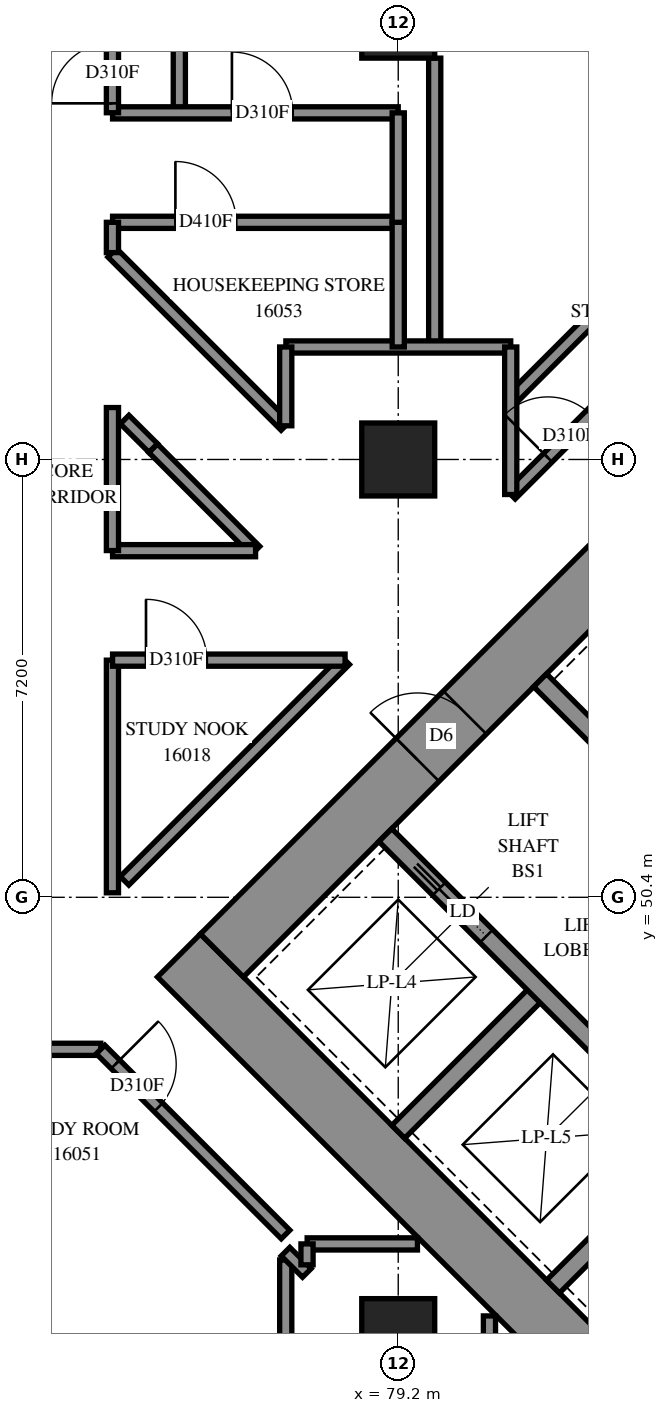
"""IFC4 building model, lengths in metres.
Left out: names, types, materials, properties, quantities, classifications, styles, units other than length and angle.
Written with IfcOpenShell. Run it as: python <this file> out.ifc"""

import sys

from ifc_helpers import new_model, si_unit, direction, frame, frame_2d, origin, origin_2d, place, context, subcontext, project, spatial, rectangle, extrude, element, fill, save


model = new_model("IFC4")
c1 = context("Model", 3, precision=1e-05, world=origin(), true_north=direction((0.0, 1.0)))
c2 = subcontext(c1, "Body", "Model", "MODEL_VIEW")
j1 = project(units=[si_unit("LENGTHUNIT", "METRE"), si_unit("PLANEANGLEUNIT", "RADIAN")], contexts=[c1])
p1 = place(None, origin())
s1 = spatial("IfcSite", under=j1, at=p1, CompositionType="ELEMENT")
p2 = place(p1, origin())
s2 = spatial("IfcBuilding", under=s1, at=p2, CompositionType="ELEMENT")
p3 = place(p2, frame((0.0, 0.0, 61.0)))
s3 = spatial("IfcBuildingStorey", under=s2, at=p3, CompositionType="ELEMENT", Elevation=61.0)
for number, where, z_axis, x_axis in (
    (1, (79.2, 43.2, 0.0), (0.0, 0.0, 1.0), (1.0, 0.0, 0.0)),
    (2, (79.2, 57.6, 0.0), (0.0, 0.0, 1.0), (1.0, 0.0, 0.0)),
    (3, (79.2, 64.8, 0.0), (0.0, 0.0, 1.0), (1.0, 0.0, 0.0)),
):
    element("IfcColumn", number, at=place(p3, frame(where, z_axis=z_axis, x_axis=x_axis)), inside=s3, PredefinedType="COLUMN", context=c2, shape_type="SweptSolid", body=[
        extrude(rectangle(XDim=1.2, YDim=1.2, at=origin_2d()), origin(), (0.0, 0.0, 1.0), 3.1),
    ])
p4 = place(p3, frame((75.594, 49.443, -0.3), z_axis=(0.0, 0.0, 1.0), x_axis=(0.7071037324, -0.70710983, 0.0)))
e4 = element("IfcWall", 4, at=p4, inside=s3, PredefinedType="SHEAR", context=c2, shape_type="SweptSolid", body=[
    extrude(rectangle(XDim=16.4, YDim=1.0, at=frame_2d((8.2, 0.0))), origin(), (0.0, 0.0, 1.0), 2.7),
])
p5 = place(p3, frame((76.301, 49.443, -0.3), z_axis=(0.0, 0.0, 1.0), x_axis=(0.7071067812, 0.7071067812, 0.0)))
e5 = element("IfcWall", 5, at=p5, inside=s3, PredefinedType="SHEAR", context=c2, shape_type="SweptSolid", body=[
    extrude(rectangle(XDim=14.4, YDim=1.0, at=frame_2d((7.2, 0.0))), origin(), (0.0, 0.0, 1.0), 2.7),
])
p6 = place(p5, frame((4.55, 0.0, 0.3)))
e6 = element("IfcOpeningElement", 6, at=p6, cuts=e5, PredefinedType="OPENING", context=c2, shape_type="SweptSolid", body=[
    extrude(rectangle(XDim=1.1, YDim=2.1, at=frame_2d((0.55, 1.05))), frame((0.0, 0.51, 0.0), z_axis=(0.0, -1.0, 0.0), x_axis=(1.0, 0.0, 0.0)), (0.0, 0.0, 1.0), 1.02),
])
p7 = place(p5, frame((11.35, 0.0, 0.3)))
e7 = element("IfcOpeningElement", 7, at=p7, cuts=e5, PredefinedType="OPENING", context=c2, shape_type="SweptSolid", body=[
    extrude(rectangle(XDim=1.1, YDim=2.1, at=frame_2d((0.55, 1.05))), frame((0.0, 0.51, 0.0), z_axis=(0.0, -1.0, 0.0), x_axis=(1.0, 0.0, 0.0)), (0.0, 0.0, 1.0), 1.02),
])
p8 = place(p3, frame((79.2, 46.544, 0.0), z_axis=(0.0, 0.0, 1.0), x_axis=(0.7071219326, 0.7070916295, 0.0)))
e8 = element("IfcWall", 8, at=p8, inside=s3, PredefinedType="SOLIDWALL", context=c2, shape_type="SweptSolid", body=[
    extrude(rectangle(XDim=3.3, YDim=0.3, at=frame_2d((1.65, 0.0))), origin(), (0.0, 0.0, 1.0), 3.1),
])
p9 = place(p3, frame((81.746, 43.999, 0.0), z_axis=(0.0, 0.0, 1.0), x_axis=(0.7071067812, 0.7071067812, 0.0)))
e9 = element("IfcWall", 9, at=p9, inside=s3, PredefinedType="SOLIDWALL", context=c2, shape_type="SweptSolid", body=[
    extrude(rectangle(XDim=3.3, YDim=0.3, at=frame_2d((1.65, 0.0))), origin(), (0.0, 0.0, 1.0), 3.1),
])
p10 = place(p3, frame((78.988, 51.423, 0.0), z_axis=(0.0, 0.0, 1.0), x_axis=(0.7071067812, -0.7071067812, 0.0)))
e10 = element("IfcWall", 10, at=p10, inside=s3, PredefinedType="SOLIDWALL", context=c2, shape_type="SweptSolid", body=[
    extrude(rectangle(XDim=14.4, YDim=0.3, at=frame_2d((7.2, 0.0))), origin(), (0.0, 0.0, 1.0), 3.1),
])
p11 = place(p10, frame((1.25, 0.0, 0.0)))
e11 = element("IfcOpeningElement", 11, at=p11, cuts=e10, PredefinedType="OPENING", context=c2, shape_type="SweptSolid", body=[
    extrude(rectangle(XDim=1.1, YDim=2.1, at=frame_2d((0.55, 1.05))), frame((0.0, 0.16, 0.0), z_axis=(0.0, -1.0, 0.0), x_axis=(1.0, 0.0, 0.0)), (0.0, 0.0, 1.0), 0.32),
])
p12 = place(p10, frame((4.85, 0.0, 0.0)))
e12 = element("IfcOpeningElement", 12, at=p12, cuts=e10, PredefinedType="OPENING", context=c2, shape_type="SweptSolid", body=[
    extrude(rectangle(XDim=1.1, YDim=2.1, at=frame_2d((0.55, 1.05))), frame((0.0, 0.16, 0.0), z_axis=(0.0, -1.0, 0.0), x_axis=(1.0, 0.0, 0.0)), (0.0, 0.0, 1.0), 0.32),
])
p13 = place(p10, frame((8.45, 0.0, 0.0)))
e13 = element("IfcOpeningElement", 13, at=p13, cuts=e10, PredefinedType="OPENING", context=c2, shape_type="SweptSolid", body=[
    extrude(rectangle(XDim=1.1, YDim=2.1, at=frame_2d((0.55, 1.05))), frame((0.0, 0.16, 0.0), z_axis=(0.0, -1.0, 0.0), x_axis=(1.0, 0.0, 0.0)), (0.0, 0.0, 1.0), 0.32),
])
p14 = place(p10, frame((12.05, 0.0, 0.0)))
e14 = element("IfcOpeningElement", 14, at=p14, cuts=e10, PredefinedType="OPENING", context=c2, shape_type="SweptSolid", body=[
    extrude(rectangle(XDim=1.1, YDim=2.1, at=frame_2d((0.55, 1.05))), frame((0.0, 0.16, 0.0), z_axis=(0.0, -1.0, 0.0), x_axis=(1.0, 0.0, 0.0)), (0.0, 0.0, 1.0), 0.32),
])
p15 = place(p3, frame((81.534, 53.969, 0.0), z_axis=(0.0, 0.0, 1.0), x_axis=(0.707103309, -0.7071102534, 0.0)))
e15 = element("IfcWall", 15, at=p15, inside=s3, PredefinedType="SOLIDWALL", context=c2, shape_type="SweptSolid", body=[
    extrude(rectangle(XDim=14.4, YDim=0.3, at=frame_2d((7.2, 0.0))), origin(), (0.0, 0.0, 1.0), 3.1),
])
p16 = place(p15, frame((12.05, 0.0, 0.0)))
e16 = element("IfcOpeningElement", 16, at=p16, cuts=e15, PredefinedType="OPENING", context=c2, shape_type="SweptSolid", body=[
    extrude(rectangle(XDim=1.1, YDim=2.1, at=frame_2d((0.55, 1.05))), frame((0.0, 0.16, 0.0), z_axis=(0.0, -1.0, 0.0), x_axis=(1.0, 0.0, 0.0)), (0.0, 0.0, 1.0), 0.32),
])
p17 = place(p3, frame((55.1, 47.9, 0.0), z_axis=(0.0, 0.0, 1.0), x_axis=(1.0, 0.0, 0.0)))
e17 = element("IfcWall", 17, at=p17, inside=s3, PredefinedType="PARTITIONING", context=c2, shape_type="SweptSolid", body=[
    extrude(rectangle(XDim=19.208, YDim=0.2, at=frame_2d((9.604, 0.0))), origin(), (0.0, 0.0, 1.0), 3.1),
])
p18 = place(p17, frame((6.399, 0.0, 0.0)))
e18 = element("IfcOpeningElement", 18, at=p18, cuts=e17, PredefinedType="OPENING", context=c2, shape_type="SweptSolid", body=[
    extrude(rectangle(XDim=0.9, YDim=2.1, at=frame_2d((0.45, 1.05))), frame((0.0, 0.11, 0.0), z_axis=(0.0, -1.0, 0.0), x_axis=(1.0, 0.0, 0.0)), (0.0, 0.0, 1.0), 0.22),
])
p19 = place(p17, frame((13.561, 0.0, 0.0)))
e19 = element("IfcOpeningElement", 19, at=p19, cuts=e17, PredefinedType="OPENING", context=c2, shape_type="SweptSolid", body=[
    extrude(rectangle(XDim=0.9, YDim=2.1, at=frame_2d((0.45, 1.05))), frame((0.0, 0.11, 0.0), z_axis=(0.0, -1.0, 0.0), x_axis=(1.0, 0.0, 0.0)), (0.0, 0.0, 1.0), 0.22),
])
p20 = place(p3, frame((75.6, 63.3, 0.0), z_axis=(0.0, 0.0, 1.0), x_axis=(0.0, 1.0, 0.0)))
e20 = element("IfcWall", 20, at=p20, inside=s3, PredefinedType="PARTITIONING", context=c2, shape_type="SweptSolid", body=[
    extrude(rectangle(XDim=9.467, YDim=0.2, at=frame_2d((4.734, 0.0))), origin(), (0.0, 0.0, 1.0), 3.1),
])
p21 = place(p3, frame((81.049, 58.577, 0.0), z_axis=(0.0, 0.0, 1.0), x_axis=(0.7071067812, 0.7071067812, 0.0)))
e21 = element("IfcWall", 21, at=p21, inside=s3, PredefinedType="PARTITIONING", context=c2, shape_type="SweptSolid", body=[
    extrude(rectangle(XDim=9.086, YDim=0.2, at=frame_2d((4.543, 0.0))), origin(), (0.0, 0.0, 1.0), 3.1),
])
p22 = place(p3, frame((81.053, 57.021, 0.0), z_axis=(0.0, 0.0, 1.0), x_axis=(0.7069845395, 0.7072290017, 0.0)))
e22 = element("IfcWall", 22, at=p22, inside=s3, PredefinedType="PARTITIONING", context=c2, shape_type="SweptSolid", body=[
    extrude(rectangle(XDim=8.181, YDim=0.2, at=frame_2d((4.091, 0.0))), origin(), (0.0, 0.0, 1.0), 3.1),
])
p23 = place(p22, frame((0.86, 0.0, 0.0)))
e23 = element("IfcOpeningElement", 23, at=p23, cuts=e22, PredefinedType="OPENING", context=c2, shape_type="SweptSolid", body=[
    extrude(rectangle(XDim=1.0, YDim=2.1, at=frame_2d((0.5, 1.05))), frame((0.0, 0.11, 0.0), z_axis=(0.0, -1.0, 0.0), x_axis=(1.0, 0.0, 0.0)), (0.0, 0.0, 1.0), 0.22),
])
p24 = place(p3, frame((74.699, 50.671, 0.0), z_axis=(0.0, 0.0, 1.0), x_axis=(0.7071067812, 0.7071067812, 0.0)))
e24 = element("IfcWall", 24, at=p24, inside=s3, PredefinedType="PARTITIONING", context=c2, shape_type="SweptSolid", body=[
    extrude(rectangle(XDim=5.131, YDim=0.2, at=frame_2d((2.565, 0.0))), origin(), (0.0, 0.0, 1.0), 3.1),
])
p25 = place(p3, frame((79.8, 59.45, 0.0), z_axis=(0.0, 0.0, 1.0), x_axis=(0.0, 1.0, 0.0)))
e25 = element("IfcWall", 25, at=p25, inside=s3, PredefinedType="PARTITIONING", context=c2, shape_type="SweptSolid", body=[
    extrude(rectangle(XDim=4.75, YDim=0.2, at=frame_2d((2.375, 0.0))), origin(), (0.0, 0.0, 1.0), 3.1),
])
p26 = place(p3, frame((74.502, 63.3, 0.0), z_axis=(0.0, 0.0, 1.0), x_axis=(1.0, 0.0, 0.0)))
e26 = element("IfcWall", 26, at=p26, inside=s3, PredefinedType="PARTITIONING", context=c2, shape_type="SweptSolid", body=[
    extrude(rectangle(XDim=4.698, YDim=0.2, at=frame_2d((2.349, 0.0))), origin(), (0.0, 0.0, 1.0), 3.1),
])
p27 = place(p26, frame((1.963, 0.0, 0.0)))
e27 = element("IfcOpeningElement", 27, at=p27, cuts=e26, PredefinedType="OPENING", context=c2, shape_type="SweptSolid", body=[
    extrude(rectangle(XDim=1.0, YDim=2.1, at=frame_2d((0.5, 1.05))), frame((0.0, 0.11, 0.0), z_axis=(0.0, -1.0, 0.0), x_axis=(1.0, 0.0, 0.0)), (0.0, 0.0, 1.0), 0.22),
])
p28 = place(p3, frame((74.502, 61.5, 0.0), z_axis=(0.0, 0.0, 1.0), x_axis=(1.0, 0.0, 0.0)))
e28 = element("IfcWall", 28, at=p28, inside=s3, PredefinedType="PARTITIONING", context=c2, shape_type="SweptSolid", body=[
    extrude(rectangle(XDim=4.698, YDim=0.2, at=frame_2d((2.349, 0.0))), origin(), (0.0, 0.0, 1.0), 3.1),
])
p29 = place(p28, frame((1.034, 0.0, 0.0)))
e29 = element("IfcOpeningElement", 29, at=p29, cuts=e28, PredefinedType="OPENING", context=c2, shape_type="SweptSolid", body=[
    extrude(rectangle(XDim=1.0, YDim=2.1, at=frame_2d((0.5, 1.05))), frame((0.0, 0.11, 0.0), z_axis=(0.0, -1.0, 0.0), x_axis=(1.0, 0.0, 0.0)), (0.0, 0.0, 1.0), 0.22),
])
p30 = place(p3, frame((74.305, 47.897, 0.0), z_axis=(0.0, 0.0, 1.0), x_axis=(0.7071067812, -0.7071067812, 0.0)))
e30 = element("IfcWall", 30, at=p30, inside=s3, PredefinedType="PARTITIONING", context=c2, shape_type="SweptSolid", body=[
    extrude(rectangle(XDim=4.302, YDim=0.2, at=frame_2d((2.151, 0.0))), origin(), (0.0, 0.0, 1.0), 3.1),
])
p31 = place(p30, frame((0.345, 0.0, 0.0)))
e31 = element("IfcOpeningElement", 31, at=p31, cuts=e30, PredefinedType="OPENING", context=c2, shape_type="SweptSolid", body=[
    extrude(rectangle(XDim=1.0, YDim=2.1, at=frame_2d((0.5, 1.05))), frame((0.0, 0.11, 0.0), z_axis=(0.0, -1.0, 0.0), x_axis=(1.0, 0.0, 0.0)), (0.0, 0.0, 1.0), 0.22),
])
p32 = place(p3, frame((74.497, 60.999, 0.0), z_axis=(0.0, 0.0, 1.0), x_axis=(0.7071067812, -0.7071067812, 0.0)))
e32 = element("IfcWall", 32, at=p32, inside=s3, PredefinedType="PARTITIONING", context=c2, shape_type="SweptSolid", body=[
    extrude(rectangle(XDim=4.028, YDim=0.2, at=frame_2d((2.014, 0.0))), origin(), (0.0, 0.0, 1.0), 3.1),
])
p33 = place(p3, frame((74.5, 63.302, 0.0), z_axis=(0.0, 0.0, 1.0), x_axis=(0.0, 1.0, 0.0)))
e33 = element("IfcWall", 33, at=p33, inside=s3, PredefinedType="PARTITIONING", context=c2, shape_type="SweptSolid", body=[
    extrude(rectangle(XDim=3.998, YDim=0.2, at=frame_2d((1.999, 0.0))), origin(), (0.0, 0.0, 1.0), 3.1),
])
p34 = place(p33, frame((0.154, 0.0, 0.0)))
e34 = element("IfcOpeningElement", 34, at=p34, cuts=e33, PredefinedType="OPENING", context=c2, shape_type="SweptSolid", body=[
    extrude(rectangle(XDim=1.0, YDim=2.1, at=frame_2d((0.5, 1.05))), frame((0.0, 0.11, 0.0), z_axis=(0.0, -1.0, 0.0), x_axis=(1.0, 0.0, 0.0)), (0.0, 0.0, 1.0), 0.22),
])
p35 = place(p3, frame((74.5, 50.474, 0.0), z_axis=(0.0, 0.0, 1.0), x_axis=(0.0, 1.0, 0.0)))
e35 = element("IfcWall", 35, at=p35, inside=s3, PredefinedType="PARTITIONING", context=c2, shape_type="SweptSolid", body=[
    extrude(rectangle(XDim=3.826, YDim=0.2, at=frame_2d((1.913, 0.0))), origin(), (0.0, 0.0, 1.0), 3.1),
])
p36 = place(p3, frame((74.502, 54.3, 0.0), z_axis=(0.0, 0.0, 1.0), x_axis=(1.0, 0.0, 0.0)))
e36 = element("IfcWall", 36, at=p36, inside=s3, PredefinedType="PARTITIONING", context=c2, shape_type="SweptSolid", body=[
    extrude(rectangle(XDim=3.824, YDim=0.2, at=frame_2d((1.912, 0.0))), origin(), (0.0, 0.0, 1.0), 3.1),
])
p37 = place(p36, frame((0.55, 0.0, 0.0)))
e37 = element("IfcOpeningElement", 37, at=p37, cuts=e36, PredefinedType="OPENING", context=c2, shape_type="SweptSolid", body=[
    extrude(rectangle(XDim=1.0, YDim=2.1, at=frame_2d((0.5, 1.05))), frame((0.0, 0.11, 0.0), z_axis=(0.0, -1.0, 0.0), x_axis=(1.0, 0.0, 0.0)), (0.0, 0.0, 1.0), 0.22),
])
p38 = place(p3, frame((77.352, 59.45, 0.0), z_axis=(0.0, 0.0, 1.0), x_axis=(1.0, 0.0, 0.0)))
e38 = element("IfcWall", 38, at=p38, inside=s3, PredefinedType="PARTITIONING", context=c2, shape_type="SweptSolid", body=[
    extrude(rectangle(XDim=3.698, YDim=0.2, at=frame_2d((1.849, 0.0))), origin(), (0.0, 0.0, 1.0), 3.1),
])
p39 = place(p3, frame((77.35, 40.949, 0.0), z_axis=(0.0, 0.0, 1.0), x_axis=(0.0, 1.0, 0.0)))
e39 = element("IfcWall", 39, at=p39, inside=s3, PredefinedType="PARTITIONING", context=c2, shape_type="SweptSolid", body=[
    extrude(rectangle(XDim=3.487, YDim=0.2, at=frame_2d((1.743, 0.0))), origin(), (0.0, 0.0, 1.0), 3.1),
])
p40 = place(p3, frame((81.05, 57.024, 0.0), z_axis=(0.0, 0.0, 1.0), x_axis=(0.0, 1.0, 0.0)))
e40 = element("IfcWall", 40, at=p40, inside=s3, PredefinedType="PARTITIONING", context=c2, shape_type="SweptSolid", body=[
    extrude(rectangle(XDim=2.426, YDim=0.2, at=frame_2d((1.213, 0.0))), origin(), (0.0, 0.0, 1.0), 3.1),
])
p41 = place(p3, frame((75.168, 57.786, 0.0), z_axis=(0.0, 0.0, 1.0), x_axis=(0.7066870088, -0.7075263045, 0.0)))
e41 = element("IfcWall", 41, at=p41, inside=s3, PredefinedType="PARTITIONING", context=c2, shape_type="SweptSolid", body=[
    extrude(rectangle(XDim=2.383, YDim=0.2, at=frame_2d((1.192, 0.0))), origin(), (0.0, 0.0, 1.0), 3.1),
])
for number, where, z_axis, x_axis in (
    (42, (74.502, 56.1, 0.0), (0.0, 0.0, 1.0), (1.0, 0.0, 0.0)),
    (43, (74.5, 56.102, 0.0), (0.0, 0.0, 1.0), (0.0, 1.0, 0.0)),
):
    element("IfcWall", number, at=place(p3, frame(where, z_axis=z_axis, x_axis=x_axis)), inside=s3, PredefinedType="PARTITIONING", context=c2, shape_type="SweptSolid", body=[
        extrude(rectangle(XDim=2.352, YDim=0.2, at=frame_2d((1.176, 0.0))), origin(), (0.0, 0.0, 1.0), 3.1),
    ])
p42 = place(p3, frame((79.2, 59.45, 0.0), z_axis=(0.0, 0.0, 1.0), x_axis=(0.0, 1.0, 0.0)))
e44 = element("IfcWall", 44, at=p42, inside=s3, PredefinedType="PARTITIONING", context=c2, shape_type="SweptSolid", body=[
    extrude(rectangle(XDim=2.05, YDim=0.2, at=frame_2d((1.025, 0.0))), origin(), (0.0, 0.0, 1.0), 3.1),
])
for number, where, z_axis, x_axis in (
    (45, (77.702, 44.7, 0.0), (0.0, 0.0, 1.0), (1.0, 0.0, 0.0)),
    (46, (80.7, 41.702, 0.0), (0.0, 0.0, 1.0), (0.0, 1.0, 0.0)),
):
    element("IfcWall", number, at=place(p3, frame(where, z_axis=z_axis, x_axis=x_axis)), inside=s3, PredefinedType="PARTITIONING", context=c2, shape_type="SweptSolid", body=[
        extrude(rectangle(XDim=1.814, YDim=0.2, at=frame_2d((0.907, 0.0))), origin(), (0.0, 0.0, 1.0), 3.1),
    ])
p43 = place(p3, frame((79.2, 61.5, 0.0), z_axis=(0.0, 0.0, 1.0), x_axis=(0.0, 1.0, 0.0)))
e47 = element("IfcWall", 47, at=p43, inside=s3, PredefinedType="PARTITIONING", context=c2, shape_type="SweptSolid", body=[
    extrude(rectangle(XDim=1.8, YDim=0.2, at=frame_2d((0.9, 0.0))), origin(), (0.0, 0.0, 1.0), 3.1),
])
p44 = place(p3, frame((77.35, 58.154, 0.0), z_axis=(0.0, 0.0, 1.0), x_axis=(0.0, 1.0, 0.0)))
e48 = element("IfcWall", 48, at=p44, inside=s3, PredefinedType="PARTITIONING", context=c2, shape_type="SweptSolid", body=[
    extrude(rectangle(XDim=1.296, YDim=0.2, at=frame_2d((0.648, 0.0))), origin(), (0.0, 0.0, 1.0), 3.1),
])
p45 = place(p3, frame((74.701, 58.257, 0.0), z_axis=(0.0, 0.0, 1.0), x_axis=(0.7086128608, -0.7055974869, 0.0)))
e49 = element("IfcWall", 49, at=p45, inside=s3, PredefinedType="PARTITIONING", context=c2, shape_type="SweptSolid", body=[
    extrude(rectangle(XDim=0.663, YDim=0.2, at=frame_2d((0.332, 0.0))), origin(), (0.0, 0.0, 1.0), 3.1),
])
p46 = place(p3, frame((74.5, 61.002, 0.0), z_axis=(0.0, 0.0, 1.0), x_axis=(0.0, 1.0, 0.0)))
e50 = element("IfcWall", 50, at=p46, inside=s3, PredefinedType="PARTITIONING", context=c2, shape_type="SweptSolid", body=[
    extrude(rectangle(XDim=0.498, YDim=0.2, at=frame_2d((0.249, 0.0))), origin(), (0.0, 0.0, 1.0), 3.1),
])
p47 = place(p3, frame((77.347, 44.573, 0.0), z_axis=(0.0, 0.0, 1.0), x_axis=(0.7071067812, -0.7071067812, 0.0)))
e51 = element("IfcWall", 51, at=p47, inside=s3, PredefinedType="PARTITIONING", context=c2, shape_type="SweptSolid", body=[
    extrude(rectangle(XDim=0.495, YDim=0.2, at=frame_2d((0.247, 0.0))), origin(), (0.0, 0.0, 1.0), 3.1),
])
p48 = place(p3, frame((77.7, 44.356, 0.0), z_axis=(0.0, 0.0, 1.0), x_axis=(0.0, 1.0, 0.0)))
e52 = element("IfcWall", 52, at=p48, inside=s3, PredefinedType="PARTITIONING", context=c2, shape_type="SweptSolid", body=[
    extrude(rectangle(XDim=0.344, YDim=0.2, at=frame_2d((0.172, 0.0))), origin(), (0.0, 0.0, 1.0), 3.1),
])
p49 = place(p6, origin())
e53 = element("IfcDoor", 53, at=p49, inside=s3, OperationType="DOUBLE_DOOR_SINGLE_SWING", PredefinedType="DOOR", context=c2, shape_type="SweptSolid", body=[
    extrude(rectangle(XDim=1.1, YDim=2.1, at=frame_2d((0.55, 1.05))), frame((0.0, 0.025, 0.0), z_axis=(0.0, -1.0, 0.0), x_axis=(1.0, 0.0, 0.0)), (0.0, 0.0, 1.0), 0.05),
])
fill(e6, e53)
p50 = place(p11, origin())
e54 = element("IfcDoor", 54, at=p50, inside=s3, OperationType="SLIDING_TO_LEFT", PredefinedType="DOOR", context=c2, shape_type="SweptSolid", body=[
    extrude(rectangle(XDim=1.1, YDim=2.1, at=frame_2d((0.55, 1.05))), frame((0.0, 0.025, 0.0), z_axis=(0.0, -1.0, 0.0), x_axis=(1.0, 0.0, 0.0)), (0.0, 0.0, 1.0), 0.05),
])
fill(e11, e54)
p51 = place(p37, origin())
e55 = element("IfcDoor", 55, at=p51, inside=s3, OperationType="SINGLE_SWING_RIGHT", PredefinedType="DOOR", context=c2, shape_type="SweptSolid", body=[
    extrude(rectangle(XDim=1.0, YDim=2.1, at=frame_2d((0.5, 1.05))), frame((0.0, 0.025, 0.0), z_axis=(0.0, -1.0, 0.0), x_axis=(1.0, 0.0, 0.0)), (0.0, 0.0, 1.0), 0.05),
])
fill(e37, e55)
p52 = place(p34, origin())
e56 = element("IfcDoor", 56, at=p52, inside=s3, OperationType="SINGLE_SWING_RIGHT", PredefinedType="DOOR", context=c2, shape_type="SweptSolid", body=[
    extrude(rectangle(XDim=1.0, YDim=2.1, at=frame_2d((0.5, 1.05))), frame((0.0, 0.025, 0.0), z_axis=(0.0, -1.0, 0.0), x_axis=(1.0, 0.0, 0.0)), (0.0, 0.0, 1.0), 0.05),
])
fill(e34, e56)
p53 = place(p31, origin())
e57 = element("IfcDoor", 57, at=p53, inside=s3, OperationType="SINGLE_SWING_LEFT", PredefinedType="DOOR", context=c2, shape_type="SweptSolid", body=[
    extrude(rectangle(XDim=1.0, YDim=2.1, at=frame_2d((0.5, 1.05))), frame((0.0, 0.025, 0.0), z_axis=(0.0, -1.0, 0.0), x_axis=(1.0, 0.0, 0.0)), (0.0, 0.0, 1.0), 0.05),
])
fill(e31, e57)
p54 = place(p27, origin())
e58 = element("IfcDoor", 58, at=p54, inside=s3, OperationType="SINGLE_SWING_LEFT", PredefinedType="DOOR", context=c2, shape_type="SweptSolid", body=[
    extrude(rectangle(XDim=1.0, YDim=2.1, at=frame_2d((0.5, 1.05))), frame((0.0, 0.025, 0.0), z_axis=(0.0, -1.0, 0.0), x_axis=(1.0, 0.0, 0.0)), (0.0, 0.0, 1.0), 0.05),
])
fill(e27, e58)
p55 = place(p29, origin())
e59 = element("IfcDoor", 59, at=p55, inside=s3, OperationType="SINGLE_SWING_RIGHT", PredefinedType="DOOR", context=c2, shape_type="SweptSolid", body=[
    extrude(rectangle(XDim=1.0, YDim=2.1, at=frame_2d((0.5, 1.05))), frame((0.0, 0.025, 0.0), z_axis=(0.0, -1.0, 0.0), x_axis=(1.0, 0.0, 0.0)), (0.0, 0.0, 1.0), 0.05),
])
fill(e29, e59)
p56 = place(p23, origin())
e60 = element("IfcDoor", 60, at=p56, inside=s3, OperationType="SINGLE_SWING_RIGHT", PredefinedType="DOOR", context=c2, shape_type="SweptSolid", body=[
    extrude(rectangle(XDim=1.0, YDim=2.1, at=frame_2d((0.5, 1.05))), frame((0.0, 0.025, 0.0), z_axis=(0.0, -1.0, 0.0), x_axis=(1.0, 0.0, 0.0)), (0.0, 0.0, 1.0), 0.05),
])
fill(e23, e60)
save(model, sys.argv[1])
